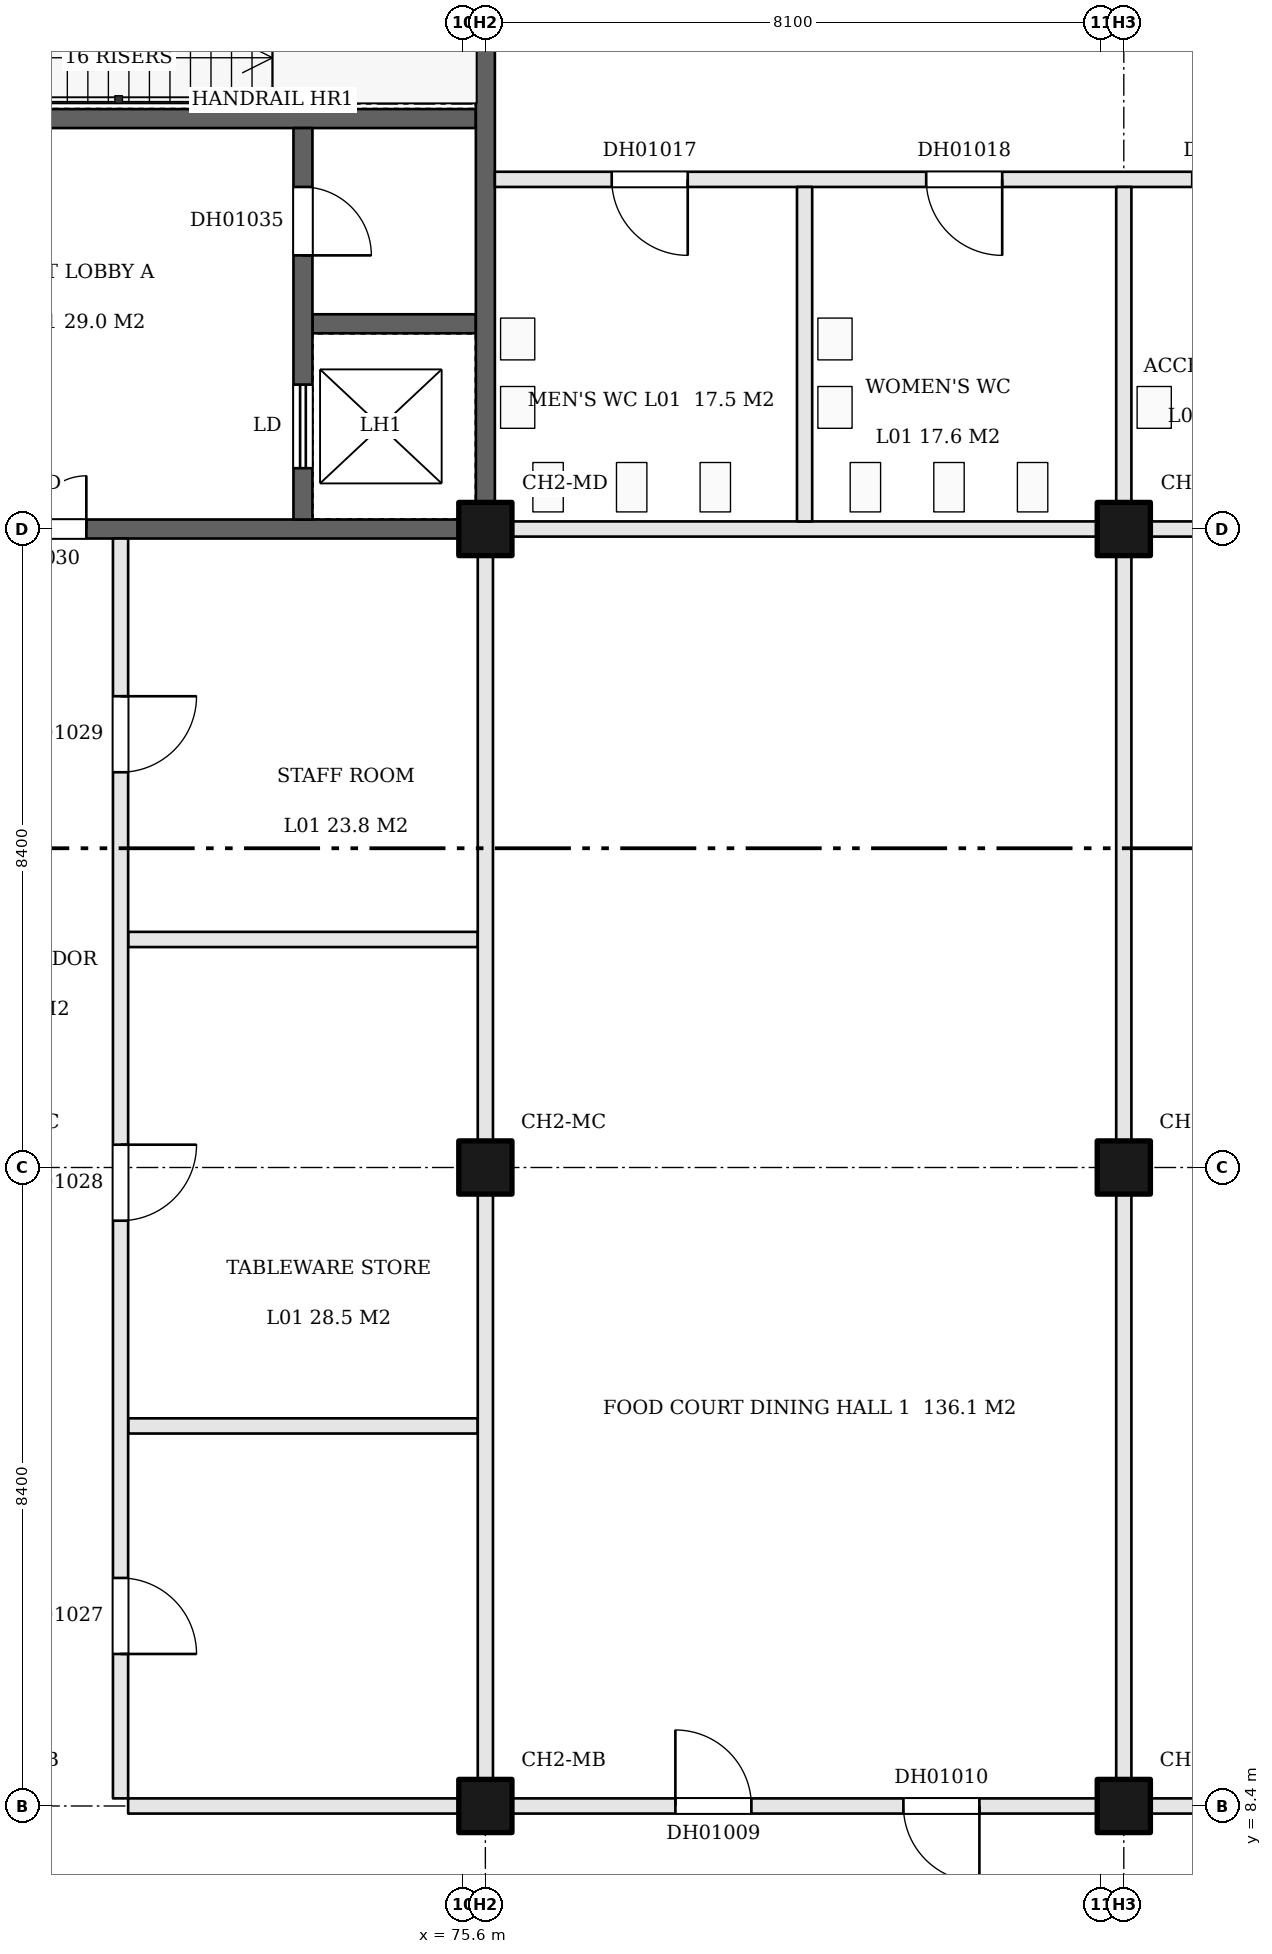
"""IFC4 building model, lengths in metres.
Left out: names, types, materials, properties, quantities, classifications, styles, units other than length and angle.
Written with IfcOpenShell. Run it as: python <this file> out.ifc"""

import sys

from ifc_helpers import new_model, si_unit, direction, frame, frame_2d, origin, origin_2d, place, context, subcontext, project, spatial, rectangle, extrude, element, fill, save


model = new_model("IFC4")
c1 = context("Model", 3, precision=1e-05, world=origin(), true_north=direction((0.0, 1.0)))
c2 = subcontext(c1, "Body", "Model", "MODEL_VIEW")
j1 = project(units=[si_unit("LENGTHUNIT", "METRE"), si_unit("PLANEANGLEUNIT", "RADIAN")], contexts=[c1])
p1 = place(None, origin())
s1 = spatial("IfcSite", under=j1, at=p1, CompositionType="ELEMENT")
p2 = place(p1, origin())
s2 = spatial("IfcBuilding", under=s1, at=p2, CompositionType="ELEMENT")
p3 = place(p2, frame((0.0, 0.0, 9.0)))
s3 = spatial("IfcBuildingStorey", under=s2, at=p3, CompositionType="ELEMENT", Elevation=9.0)
for number, where, z_axis, x_axis in (
    (1, (75.9, 8.4, 0.0), (0.0, 0.0, 1.0), (1.0, 0.0, 0.0)),
    (2, (75.9, 16.8, 0.0), (0.0, 0.0, 1.0), (1.0, 0.0, 0.0)),
    (3, (75.9, 25.2, 0.0), (0.0, 0.0, 1.0), (1.0, 0.0, 0.0)),
    (4, (84.3, 8.4, 0.0), (0.0, 0.0, 1.0), (1.0, 0.0, 0.0)),
    (5, (84.3, 16.8, 0.0), (0.0, 0.0, 1.0), (1.0, 0.0, 0.0)),
    (6, (84.3, 25.2, 0.0), (0.0, 0.0, 1.0), (1.0, 0.0, 0.0)),
):
    element("IfcColumn", number, at=place(p3, frame(where, z_axis=z_axis, x_axis=x_axis)), inside=s3, PredefinedType="COLUMN", context=c2, shape_type="SweptSolid", body=[
        extrude(rectangle(XDim=0.7, YDim=0.7, at=origin_2d()), origin(), (0.0, 0.0, 1.0), 5.1),
    ])
p4 = place(p3, frame((71.2, 8.4, 0.0), z_axis=(0.0, 0.0, 1.0), x_axis=(1.0, 0.0, 0.0)))
e7 = element("IfcWall", 7, at=p4, inside=s3, PredefinedType="PARTITIONING", context=c2, shape_type="SweptSolid", body=[
    extrude(rectangle(XDim=4.35, YDim=0.2, at=frame_2d((2.175, 0.0))), origin(), (0.0, 0.0, 1.0), 5.1),
])
p5 = place(p3, frame((76.25, 8.4, 0.0), z_axis=(0.0, 0.0, 1.0), x_axis=(1.0, 0.0, 0.0)))
e8 = element("IfcWall", 8, at=p5, inside=s3, PredefinedType="PARTITIONING", context=c2, shape_type="SweptSolid", body=[
    extrude(rectangle(XDim=7.7, YDim=0.2, at=frame_2d((3.85, 0.0))), origin(), (0.0, 0.0, 1.0), 5.1),
])
p6 = place(p5, frame((2.15, 0.0, 0.0)))
e9 = element("IfcOpeningElement", 9, at=p6, cuts=e8, PredefinedType="OPENING", context=c2, shape_type="SweptSolid", body=[
    extrude(rectangle(XDim=1.0, YDim=2.1, at=frame_2d((0.5, 1.05))), frame((0.0, 0.11, 0.0), z_axis=(0.0, -1.0, 0.0), x_axis=(1.0, 0.0, 0.0)), (0.0, 0.0, 1.0), 0.22),
])
p7 = place(p5, frame((5.15, 0.0, 0.0)))
e10 = element("IfcOpeningElement", 10, at=p7, cuts=e8, PredefinedType="OPENING", context=c2, shape_type="SweptSolid", body=[
    extrude(rectangle(XDim=1.0, YDim=2.1, at=frame_2d((0.5, 1.05))), frame((0.0, 0.11, 0.0), z_axis=(0.0, -1.0, 0.0), x_axis=(1.0, 0.0, 0.0)), (0.0, 0.0, 1.0), 0.22),
])
p8 = place(p3, frame((84.65, 8.4, 0.0), z_axis=(0.0, 0.0, 1.0), x_axis=(1.0, 0.0, 0.0)))
e11 = element("IfcWall", 11, at=p8, inside=s3, PredefinedType="PARTITIONING", context=c2, shape_type="SweptSolid", body=[
    extrude(rectangle(XDim=7.7, YDim=0.2, at=frame_2d((3.85, 0.0))), origin(), (0.0, 0.0, 1.0), 5.1),
])
p9 = place(p8, frame((2.15, 0.0, 0.0)))
e12 = element("IfcOpeningElement", 12, at=p9, cuts=e11, PredefinedType="OPENING", context=c2, shape_type="SweptSolid", body=[
    extrude(rectangle(XDim=1.0, YDim=2.1, at=frame_2d((0.5, 1.05))), frame((0.0, 0.11, 0.0), z_axis=(0.0, -1.0, 0.0), x_axis=(1.0, 0.0, 0.0)), (0.0, 0.0, 1.0), 0.22),
])
p10 = place(p8, frame((5.15, 0.0, 0.0)))
e13 = element("IfcOpeningElement", 13, at=p10, cuts=e11, PredefinedType="OPENING", context=c2, shape_type="SweptSolid", body=[
    extrude(rectangle(XDim=1.0, YDim=2.1, at=frame_2d((0.5, 1.05))), frame((0.0, 0.11, 0.0), z_axis=(0.0, -1.0, 0.0), x_axis=(1.0, 0.0, 0.0)), (0.0, 0.0, 1.0), 0.22),
])
for number, where, z_axis, x_axis in (
    (14, (71.2, 13.4, 0.0), (0.0, 0.0, 1.0), (1.0, 0.0, 0.0)),
    (15, (71.2, 19.8, 0.0), (0.0, 0.0, 1.0), (1.0, 0.0, 0.0)),
):
    element("IfcWall", number, at=place(p3, frame(where, z_axis=z_axis, x_axis=x_axis)), inside=s3, PredefinedType="PARTITIONING", context=c2, shape_type="SweptSolid", body=[
        extrude(rectangle(XDim=4.6, YDim=0.2, at=frame_2d((2.3, 0.0))), origin(), (0.0, 0.0, 1.0), 5.1),
    ])
p11 = place(p3, frame((69.05, 25.2, 0.0), z_axis=(0.0, 0.0, 1.0), x_axis=(1.0, 0.0, 0.0)))
e16 = element("IfcWall", 16, at=p11, inside=s3, PredefinedType="SHEAR", context=c2, shape_type="SweptSolid", body=[
    extrude(rectangle(XDim=6.5, YDim=0.25, at=frame_2d((3.25, 0.0))), origin(), (0.0, 0.0, 1.0), 5.1),
])
p12 = place(p11, frame((0.2, 0.0, 0.0)))
e17 = element("IfcOpeningElement", 17, at=p12, cuts=e16, PredefinedType="OPENING", context=c2, shape_type="SweptSolid", body=[
    extrude(rectangle(XDim=1.4, YDim=2.1, at=frame_2d((0.7, 1.05))), frame((0.0, 0.135, 0.0), z_axis=(0.0, -1.0, 0.0), x_axis=(1.0, 0.0, 0.0)), (0.0, 0.0, 1.0), 0.27),
])
p13 = place(p3, frame((76.25, 25.2, 0.0), z_axis=(0.0, 0.0, 1.0), x_axis=(1.0, 0.0, 0.0)))
e18 = element("IfcWall", 18, at=p13, inside=s3, PredefinedType="PARTITIONING", context=c2, shape_type="SweptSolid", body=[
    extrude(rectangle(XDim=7.7, YDim=0.2, at=frame_2d((3.85, 0.0))), origin(), (0.0, 0.0, 1.0), 5.1),
])
p14 = place(p3, frame((84.65, 25.2, 0.0), z_axis=(0.0, 0.0, 1.0), x_axis=(1.0, 0.0, 0.0)))
e19 = element("IfcWall", 19, at=p14, inside=s3, PredefinedType="PARTITIONING", context=c2, shape_type="SweptSolid", body=[
    extrude(rectangle(XDim=7.7, YDim=0.2, at=frame_2d((3.85, 0.0))), origin(), (0.0, 0.0, 1.0), 5.1),
])
p15 = place(p3, frame((73.625, 27.9, 0.0), z_axis=(0.0, 0.0, 1.0), x_axis=(1.0, 0.0, 0.0)))
e20 = element("IfcWall", 20, at=p15, inside=s3, PredefinedType="SHEAR", context=c2, shape_type="SweptSolid", body=[
    extrude(rectangle(XDim=2.15, YDim=0.25, at=frame_2d((1.075, 0.0))), origin(), (0.0, 0.0, 1.0), 5.1),
])
p16 = place(p3, frame((76.025, 29.8, 0.0), z_axis=(0.0, 0.0, 1.0), x_axis=(1.0, 0.0, 0.0)))
e21 = element("IfcWall", 21, at=p16, inside=s3, PredefinedType="PARTITIONING", context=c2, shape_type="SweptSolid", body=[
    extrude(rectangle(XDim=33.375, YDim=0.2, at=frame_2d((16.688, 0.0))), origin(), (0.0, 0.0, 1.0), 5.1),
])
p17 = place(p16, frame((1.538, 0.0, 0.0)))
e22 = element("IfcOpeningElement", 22, at=p17, cuts=e21, PredefinedType="OPENING", context=c2, shape_type="SweptSolid", body=[
    extrude(rectangle(XDim=1.0, YDim=2.1, at=frame_2d((0.5, 1.05))), frame((0.0, 0.11, 0.0), z_axis=(0.0, -1.0, 0.0), x_axis=(1.0, 0.0, 0.0)), (0.0, 0.0, 1.0), 0.22),
])
p18 = place(p16, frame((5.675, 0.0, 0.0)))
e23 = element("IfcOpeningElement", 23, at=p18, cuts=e21, PredefinedType="OPENING", context=c2, shape_type="SweptSolid", body=[
    extrude(rectangle(XDim=1.0, YDim=2.1, at=frame_2d((0.5, 1.05))), frame((0.0, 0.11, 0.0), z_axis=(0.0, -1.0, 0.0), x_axis=(1.0, 0.0, 0.0)), (0.0, 0.0, 1.0), 0.22),
])
p19 = place(p16, frame((9.175, 0.0, 0.0)))
e24 = element("IfcOpeningElement", 24, at=p19, cuts=e21, PredefinedType="OPENING", context=c2, shape_type="SweptSolid", body=[
    extrude(rectangle(XDim=1.0, YDim=2.1, at=frame_2d((0.5, 1.05))), frame((0.0, 0.11, 0.0), z_axis=(0.0, -1.0, 0.0), x_axis=(1.0, 0.0, 0.0)), (0.0, 0.0, 1.0), 0.22),
])
p20 = place(p16, frame((14.775, 0.0, 0.0)))
e25 = element("IfcOpeningElement", 25, at=p20, cuts=e21, PredefinedType="OPENING", context=c2, shape_type="SweptSolid", body=[
    extrude(rectangle(XDim=1.0, YDim=2.1, at=frame_2d((0.5, 1.05))), frame((0.0, 0.11, 0.0), z_axis=(0.0, -1.0, 0.0), x_axis=(1.0, 0.0, 0.0)), (0.0, 0.0, 1.0), 0.22),
])
p21 = place(p16, frame((22.475, 0.0, 0.0)))
e26 = element("IfcOpeningElement", 26, at=p21, cuts=e21, PredefinedType="OPENING", context=c2, shape_type="SweptSolid", body=[
    extrude(rectangle(XDim=1.0, YDim=2.1, at=frame_2d((0.5, 1.05))), frame((0.0, 0.11, 0.0), z_axis=(0.0, -1.0, 0.0), x_axis=(1.0, 0.0, 0.0)), (0.0, 0.0, 1.0), 0.22),
])
p22 = place(p16, frame((29.475, 0.0, 0.0)))
e27 = element("IfcOpeningElement", 27, at=p22, cuts=e21, PredefinedType="OPENING", context=c2, shape_type="SweptSolid", body=[
    extrude(rectangle(XDim=1.0, YDim=2.1, at=frame_2d((0.5, 1.05))), frame((0.0, 0.11, 0.0), z_axis=(0.0, -1.0, 0.0), x_axis=(1.0, 0.0, 0.0)), (0.0, 0.0, 1.0), 0.22),
])
p23 = place(p3, frame((67.75, 30.6, 0.0), z_axis=(0.0, 0.0, 1.0), x_axis=(1.0, 0.0, 0.0)))
e28 = element("IfcWall", 28, at=p23, inside=s3, PredefinedType="SHEAR", context=c2, shape_type="SweptSolid", body=[
    extrude(rectangle(XDim=8.025, YDim=0.25, at=frame_2d((4.012, 0.0))), origin(), (0.0, 0.0, 1.0), 5.1),
])
p24 = place(p23, frame((0.2, 0.0, 0.0)))
e29 = element("IfcOpeningElement", 29, at=p24, cuts=e28, PredefinedType="OPENING", context=c2, shape_type="SweptSolid", body=[
    extrude(rectangle(XDim=1.0, YDim=2.1, at=frame_2d((0.5, 1.05))), frame((0.0, 0.135, 0.0), z_axis=(0.0, -1.0, 0.0), x_axis=(1.0, 0.0, 0.0)), (0.0, 0.0, 1.0), 0.27),
])
p25 = place(p3, frame((71.1, 8.5, 0.0), z_axis=(0.0, 0.0, 1.0), x_axis=(0.0, 1.0, 0.0)))
e30 = element("IfcWall", 30, at=p25, inside=s3, PredefinedType="PARTITIONING", context=c2, shape_type="SweptSolid", body=[
    extrude(rectangle(XDim=16.575, YDim=0.2, at=frame_2d((8.288, 0.0))), origin(), (0.0, 0.0, 1.0), 5.1),
])
p26 = place(p25, frame((1.9, 0.0, 0.0)))
e31 = element("IfcOpeningElement", 31, at=p26, cuts=e30, PredefinedType="OPENING", context=c2, shape_type="SweptSolid", body=[
    extrude(rectangle(XDim=1.0, YDim=2.1, at=frame_2d((0.5, 1.05))), frame((0.0, 0.11, 0.0), z_axis=(0.0, -1.0, 0.0), x_axis=(1.0, 0.0, 0.0)), (0.0, 0.0, 1.0), 0.22),
])
p27 = place(p25, frame((7.6, 0.0, 0.0)))
e32 = element("IfcOpeningElement", 32, at=p27, cuts=e30, PredefinedType="OPENING", context=c2, shape_type="SweptSolid", body=[
    extrude(rectangle(XDim=1.0, YDim=2.1, at=frame_2d((0.5, 1.05))), frame((0.0, 0.11, 0.0), z_axis=(0.0, -1.0, 0.0), x_axis=(1.0, 0.0, 0.0)), (0.0, 0.0, 1.0), 0.22),
])
p28 = place(p25, frame((13.5, 0.0, 0.0)))
e33 = element("IfcOpeningElement", 33, at=p28, cuts=e30, PredefinedType="OPENING", context=c2, shape_type="SweptSolid", body=[
    extrude(rectangle(XDim=1.0, YDim=2.1, at=frame_2d((0.5, 1.05))), frame((0.0, 0.11, 0.0), z_axis=(0.0, -1.0, 0.0), x_axis=(1.0, 0.0, 0.0)), (0.0, 0.0, 1.0), 0.22),
])
p29 = place(p3, frame((73.5, 25.325, 0.0), z_axis=(0.0, 0.0, 1.0), x_axis=(0.0, 1.0, 0.0)))
e34 = element("IfcWall", 34, at=p29, inside=s3, PredefinedType="SHEAR", context=c2, shape_type="SweptSolid", body=[
    extrude(rectangle(XDim=5.15, YDim=0.25, at=frame_2d((2.575, 0.0))), origin(), (0.0, 0.0, 1.0), 5.1),
])
p30 = place(p29, frame((0.675, 0.0, 0.0)))
e35 = element("IfcOpeningElement", 35, at=p30, cuts=e34, PredefinedType="OPENING", context=c2, shape_type="SweptSolid", body=[
    extrude(rectangle(XDim=1.1, YDim=2.1, at=frame_2d((0.55, 1.05))), frame((0.0, 0.135, 0.0), z_axis=(0.0, -1.0, 0.0), x_axis=(1.0, 0.0, 0.0)), (0.0, 0.0, 1.0), 0.27),
])
p31 = place(p29, frame((3.475, 0.0, 0.0)))
e36 = element("IfcOpeningElement", 36, at=p31, cuts=e34, PredefinedType="OPENING", context=c2, shape_type="SweptSolid", body=[
    extrude(rectangle(XDim=0.9, YDim=2.1, at=frame_2d((0.45, 1.05))), frame((0.0, 0.135, 0.0), z_axis=(0.0, -1.0, 0.0), x_axis=(1.0, 0.0, 0.0)), (0.0, 0.0, 1.0), 0.27),
])
p32 = place(p3, frame((75.9, 8.75, 0.0), z_axis=(0.0, 0.0, 1.0), x_axis=(0.0, 1.0, 0.0)))
e37 = element("IfcWall", 37, at=p32, inside=s3, PredefinedType="PARTITIONING", context=c2, shape_type="SweptSolid", body=[
    extrude(rectangle(XDim=7.7, YDim=0.2, at=frame_2d((3.85, 0.0))), origin(), (0.0, 0.0, 1.0), 5.1),
])
p33 = place(p3, frame((75.9, 17.15, 0.0), z_axis=(0.0, 0.0, 1.0), x_axis=(0.0, 1.0, 0.0)))
e38 = element("IfcWall", 38, at=p33, inside=s3, PredefinedType="PARTITIONING", context=c2, shape_type="SweptSolid", body=[
    extrude(rectangle(XDim=7.7, YDim=0.2, at=frame_2d((3.85, 0.0))), origin(), (0.0, 0.0, 1.0), 5.1),
])
p34 = place(p3, frame((75.9, 25.55, 0.0), z_axis=(0.0, 0.0, 1.0), x_axis=(0.0, 1.0, 0.0)))
e39 = element("IfcWall", 39, at=p34, inside=s3, PredefinedType="SHEAR", context=c2, shape_type="SweptSolid", body=[
    extrude(rectangle(XDim=7.1, YDim=0.25, at=frame_2d((3.55, 0.0))), origin(), (0.0, 0.0, 1.0), 5.1),
])
p35 = place(p3, frame((80.1, 25.3, 0.0), z_axis=(0.0, 0.0, 1.0), x_axis=(0.0, 1.0, 0.0)))
e40 = element("IfcWall", 40, at=p35, inside=s3, PredefinedType="PARTITIONING", context=c2, shape_type="SweptSolid", body=[
    extrude(rectangle(XDim=4.4, YDim=0.2, at=frame_2d((2.2, 0.0))), origin(), (0.0, 0.0, 1.0), 5.1),
])
p36 = place(p3, frame((84.3, 8.75, 0.0), z_axis=(0.0, 0.0, 1.0), x_axis=(0.0, 1.0, 0.0)))
e41 = element("IfcWall", 41, at=p36, inside=s3, PredefinedType="PARTITIONING", context=c2, shape_type="SweptSolid", body=[
    extrude(rectangle(XDim=7.7, YDim=0.2, at=frame_2d((3.85, 0.0))), origin(), (0.0, 0.0, 1.0), 5.1),
])
p37 = place(p3, frame((84.3, 17.15, 0.0), z_axis=(0.0, 0.0, 1.0), x_axis=(0.0, 1.0, 0.0)))
e42 = element("IfcWall", 42, at=p37, inside=s3, PredefinedType="PARTITIONING", context=c2, shape_type="SweptSolid", body=[
    extrude(rectangle(XDim=7.7, YDim=0.2, at=frame_2d((3.85, 0.0))), origin(), (0.0, 0.0, 1.0), 5.1),
])
p38 = place(p3, frame((84.3, 25.55, 0.0), z_axis=(0.0, 0.0, 1.0), x_axis=(0.0, 1.0, 0.0)))
e43 = element("IfcWall", 43, at=p38, inside=s3, PredefinedType="PARTITIONING", context=c2, shape_type="SweptSolid", body=[
    extrude(rectangle(XDim=4.15, YDim=0.2, at=frame_2d((2.075, 0.0))), origin(), (0.0, 0.0, 1.0), 5.1),
])
p39 = place(p6, origin())
e44 = element("IfcDoor", 44, at=p39, inside=s3, OperationType="SINGLE_SWING_LEFT", PredefinedType="DOOR", context=c2, shape_type="SweptSolid", body=[
    extrude(rectangle(XDim=1.0, YDim=2.1, at=frame_2d((0.5, 1.05))), frame((0.0, 0.025, 0.0), z_axis=(0.0, -1.0, 0.0), x_axis=(1.0, 0.0, 0.0)), (0.0, 0.0, 1.0), 0.05),
])
fill(e9, e44)
p40 = place(p7, frame((1.0, 0.0, 0.0), z_axis=(0.0, 0.0, 1.0), x_axis=(-1.0, 0.0, 0.0)))
e45 = element("IfcDoor", 45, at=p40, inside=s3, OperationType="SINGLE_SWING_LEFT", PredefinedType="DOOR", context=c2, shape_type="SweptSolid", body=[
    extrude(rectangle(XDim=1.0, YDim=2.1, at=frame_2d((0.5, 1.05))), frame((0.0, 0.025, 0.0), z_axis=(0.0, -1.0, 0.0), x_axis=(1.0, 0.0, 0.0)), (0.0, 0.0, 1.0), 0.05),
])
fill(e10, e45)
p41 = place(p17, frame((1.0, 0.0, 0.0), z_axis=(0.0, 0.0, 1.0), x_axis=(-1.0, 0.0, 0.0)))
e46 = element("IfcDoor", 46, at=p41, inside=s3, OperationType="SINGLE_SWING_LEFT", PredefinedType="DOOR", context=c2, shape_type="SweptSolid", body=[
    extrude(rectangle(XDim=1.0, YDim=2.1, at=frame_2d((0.5, 1.05))), frame((0.0, 0.025, 0.0), z_axis=(0.0, -1.0, 0.0), x_axis=(1.0, 0.0, 0.0)), (0.0, 0.0, 1.0), 0.05),
])
fill(e22, e46)
p42 = place(p18, frame((1.0, 0.0, 0.0), z_axis=(0.0, 0.0, 1.0), x_axis=(-1.0, 0.0, 0.0)))
e47 = element("IfcDoor", 47, at=p42, inside=s3, OperationType="SINGLE_SWING_LEFT", PredefinedType="DOOR", context=c2, shape_type="SweptSolid", body=[
    extrude(rectangle(XDim=1.0, YDim=2.1, at=frame_2d((0.5, 1.05))), frame((0.0, 0.025, 0.0), z_axis=(0.0, -1.0, 0.0), x_axis=(1.0, 0.0, 0.0)), (0.0, 0.0, 1.0), 0.05),
])
fill(e23, e47)
p43 = place(p26, frame((1.0, 0.0, 0.0), z_axis=(0.0, 0.0, 1.0), x_axis=(-1.0, 0.0, 0.0)))
e48 = element("IfcDoor", 48, at=p43, inside=s3, OperationType="SINGLE_SWING_RIGHT", PredefinedType="DOOR", context=c2, shape_type="SweptSolid", body=[
    extrude(rectangle(XDim=1.0, YDim=2.1, at=frame_2d((0.5, 1.05))), frame((0.0, 0.025, 0.0), z_axis=(0.0, -1.0, 0.0), x_axis=(1.0, 0.0, 0.0)), (0.0, 0.0, 1.0), 0.05),
])
fill(e31, e48)
p44 = place(p27, frame((1.0, 0.0, 0.0), z_axis=(0.0, 0.0, 1.0), x_axis=(-1.0, 0.0, 0.0)))
e49 = element("IfcDoor", 49, at=p44, inside=s3, OperationType="SINGLE_SWING_LEFT", PredefinedType="DOOR", context=c2, shape_type="SweptSolid", body=[
    extrude(rectangle(XDim=1.0, YDim=2.1, at=frame_2d((0.5, 1.05))), frame((0.0, 0.025, 0.0), z_axis=(0.0, -1.0, 0.0), x_axis=(1.0, 0.0, 0.0)), (0.0, 0.0, 1.0), 0.05),
])
fill(e32, e49)
p45 = place(p28, frame((1.0, 0.0, 0.0), z_axis=(0.0, 0.0, 1.0), x_axis=(-1.0, 0.0, 0.0)))
e50 = element("IfcDoor", 50, at=p45, inside=s3, OperationType="SINGLE_SWING_LEFT", PredefinedType="DOOR", context=c2, shape_type="SweptSolid", body=[
    extrude(rectangle(XDim=1.0, YDim=2.1, at=frame_2d((0.5, 1.05))), frame((0.0, 0.025, 0.0), z_axis=(0.0, -1.0, 0.0), x_axis=(1.0, 0.0, 0.0)), (0.0, 0.0, 1.0), 0.05),
])
fill(e33, e50)
p46 = place(p12, origin())
e51 = element("IfcDoor", 51, at=p46, inside=s3, OperationType="DOUBLE_DOOR_SINGLE_SWING", PredefinedType="DOOR", context=c2, shape_type="SweptSolid", body=[
    extrude(rectangle(XDim=1.4, YDim=2.1, at=frame_2d((0.7, 1.05))), frame((0.0, 0.025, 0.0), z_axis=(0.0, -1.0, 0.0), x_axis=(1.0, 0.0, 0.0)), (0.0, 0.0, 1.0), 0.05),
])
fill(e17, e51)
p47 = place(p30, origin())
e52 = element("IfcDoor", 52, at=p47, inside=s3, OperationType="SLIDING_TO_LEFT", PredefinedType="DOOR", context=c2, shape_type="SweptSolid", body=[
    extrude(rectangle(XDim=1.1, YDim=2.1, at=frame_2d((0.55, 1.05))), frame((0.0, 0.025, 0.0), z_axis=(0.0, -1.0, 0.0), x_axis=(1.0, 0.0, 0.0)), (0.0, 0.0, 1.0), 0.05),
])
fill(e35, e52)
p48 = place(p31, frame((0.9, 0.0, 0.0), z_axis=(0.0, 0.0, 1.0), x_axis=(-1.0, 0.0, 0.0)))
e53 = element("IfcDoor", 53, at=p48, inside=s3, OperationType="SINGLE_SWING_RIGHT", PredefinedType="DOOR", context=c2, shape_type="SweptSolid", body=[
    extrude(rectangle(XDim=0.9, YDim=2.1, at=frame_2d((0.45, 1.05))), frame((0.0, 0.025, 0.0), z_axis=(0.0, -1.0, 0.0), x_axis=(1.0, 0.0, 0.0)), (0.0, 0.0, 1.0), 0.05),
])
fill(e36, e53)
save(model, sys.argv[1])
